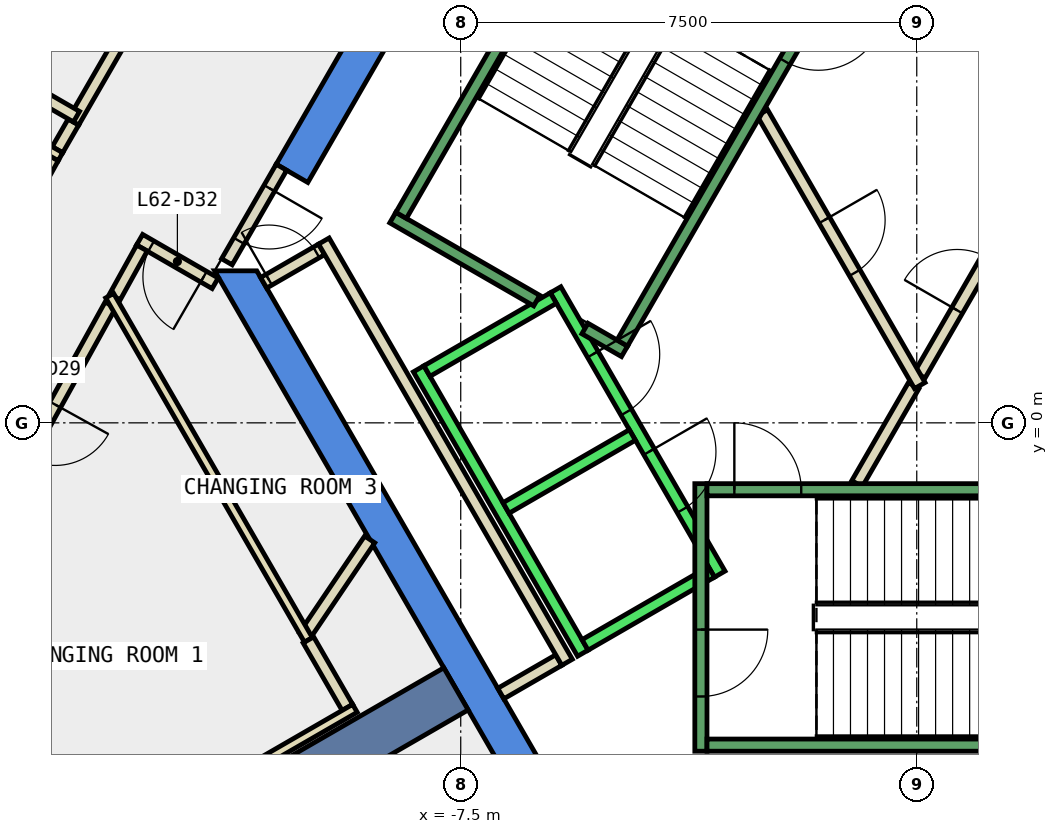
"""IFC4 building model, lengths in metres.
Left out: names, types, materials, properties, quantities, classifications, styles, units other than length and angle.
Written with IfcOpenShell. Run it as: python <this file> out.ifc"""

import sys

from ifc_helpers import new_model, si_unit, direction, frame, frame_2d, origin, place, context, subcontext, project, spatial, polyline, rectangle, outline, extrude, element, fill, save


model = new_model("IFC4")
c1 = context("Model", 3, precision=1e-05, world=origin(), true_north=direction((0.0, 1.0)))
c2 = subcontext(c1, "Body", "Model", "MODEL_VIEW")
j1 = project(units=[si_unit("LENGTHUNIT", "METRE"), si_unit("PLANEANGLEUNIT", "RADIAN")], contexts=[c1])
p1 = place(None, origin())
s1 = spatial("IfcSite", under=j1, at=p1, CompositionType="ELEMENT")
p2 = place(p1, origin())
s2 = spatial("IfcBuilding", under=s1, at=p2, CompositionType="ELEMENT")
p3 = place(p2, frame((0.0, 0.0, 270.2)))
s3 = spatial("IfcBuildingStorey", under=s2, at=p3, CompositionType="ELEMENT", Elevation=270.2)
p4 = place(p3, frame((0.0, 0.0, -0.34)))
e1 = element("IfcWall", 1, at=p4, inside=s3, PredefinedType="SHEAR", context=c2, shape_type="SweptSolid", body=[
    extrude(outline(polyline([(-10.535, 4.253), (-10.015, 3.953), (-5.427, 11.9), (-5.774, 12.5), (-10.535, 4.253)])), origin(), (0.0, 0.0, 1.0), 3.6),
])
p5 = place(p3, frame((0.0, 0.0, -0.34)))
e2 = element("IfcWall", 2, at=p5, inside=s3, PredefinedType="SHEAR", context=c2, shape_type="SweptSolid", body=[
    extrude(outline(polyline([(-11.547, 2.5), (-5.774, -7.5), (-5.427, -6.9), (-10.854, 2.5), (-11.547, 2.5)])), origin(), (0.0, 0.0, 1.0), 3.6),
])
p6 = place(p3, frame((-7.578, -4.375, -0.34), z_axis=(0.0, 0.0, 1.0), x_axis=(-0.866024315419, -0.5000018851, 0.0)))
e3 = element("IfcWall", 3, at=p6, inside=s3, PredefinedType="SHEAR", context=c2, shape_type="SweptSolid", body=[
    extrude(rectangle(XDim=9.0, YDim=0.8, at=frame_2d((4.5, 0.0))), origin(), (0.0, 0.0, 1.0), 3.6),
])
p7 = place(p3, frame((-11.539, 2.295, 0.0), z_axis=(0.0, 0.0, 1.0), x_axis=(-0.866023989838, 0.500002449018, 0.0)))
e4 = element("IfcWall", 4, at=p7, inside=s3, PredefinedType="PARTITIONING", context=c2, shape_type="SweptSolid", body=[
    extrude(rectangle(XDim=1.434, YDim=0.2, at=frame_2d((0.717, 0.0))), origin(), (0.0, 0.0, 1.0), 3.26),
])
p8 = place(p7, frame((0.217, 0.0, 0.0)))
e5 = element("IfcOpeningElement", 5, at=p8, cuts=e4, PredefinedType="OPENING", context=c2, shape_type="SweptSolid", body=[
    extrude(rectangle(XDim=1.0, YDim=2.1, at=frame_2d((0.5, 1.05))), frame((0.0, 0.11, 0.0), z_axis=(0.0, -1.0, 0.0), x_axis=(1.0, 0.0, 0.0)), (0.0, 0.0, 1.0), 0.22),
])
p9 = place(p3, frame((-12.743, 2.875, 0.0), z_axis=(0.0, 0.0, 1.0), x_axis=(-0.484334040176, -0.8748831565, 0.0)))
e6 = element("IfcWall", 6, at=p9, inside=s3, PredefinedType="PARTITIONING", context=c2, shape_type="SweptSolid", body=[
    extrude(rectangle(XDim=0.919, YDim=0.2, at=frame_2d((0.459, 0.0))), origin(), (0.0, 0.0, 1.0), 3.26),
])
p10 = place(p3, frame((-13.261, 1.939, 0.0), z_axis=(0.0, 0.0, 1.0), x_axis=(-0.484323615817, -0.874888927329, 0.0)))
e7 = element("IfcWall", 7, at=p10, inside=s3, PredefinedType="PARTITIONING", context=c2, shape_type="SweptSolid", body=[
    extrude(rectangle(XDim=4.747, YDim=0.2, at=frame_2d((2.374, 0.0))), origin(), (0.0, 0.0, 1.0), 3.26),
])
p11 = place(p10, frame((1.874, 0.0, 0.0)))
e8 = element("IfcOpeningElement", 8, at=p11, cuts=e7, PredefinedType="OPENING", context=c2, shape_type="SweptSolid", body=[
    extrude(rectangle(XDim=1.0, YDim=2.1, at=frame_2d((0.5, 1.05))), frame((0.0, 0.11, 0.0), z_axis=(0.0, -1.0, 0.0), x_axis=(1.0, 0.0, 0.0)), (0.0, 0.0, 1.0), 0.22),
])
p12 = place(p3, frame((-14.132, 4.492, 0.0), z_axis=(0.0, 0.0, 1.0), x_axis=(0.499829488579, 0.86612382622, 0.0)))
e9 = element("IfcWall", 9, at=p12, inside=s3, PredefinedType="PARTITIONING", context=c2, shape_type="SweptSolid", body=[
    extrude(rectangle(XDim=0.527, YDim=0.2, at=frame_2d((0.263, 0.0))), origin(), (0.0, 0.0, 1.0), 3.26),
])
p13 = place(p3, frame((-13.869, 4.948, 0.0), z_axis=(0.0, 0.0, 1.0), x_axis=(0.49994636267, 0.866056369097, 0.0)))
e10 = element("IfcWall", 10, at=p13, inside=s3, PredefinedType="PARTITIONING", context=c2, shape_type="SweptSolid", body=[
    extrude(rectangle(XDim=2.8, YDim=0.2, at=frame_2d((1.4, 0.0))), origin(), (0.0, 0.0, 1.0), 3.26),
])
p14 = place(p3, frame((-15.671, 1.714, 0.0), z_axis=(0.0, 0.0, 1.0), x_axis=(0.484203367026, 0.874955484216, 0.0)))
e11 = element("IfcWall", 11, at=p14, inside=s3, PredefinedType="PARTITIONING", context=c2, shape_type="SweptSolid", body=[
    extrude(rectangle(XDim=3.025, YDim=0.2, at=frame_2d((1.513, 0.0))), origin(), (0.0, 0.0, 1.0), 3.26),
])
p15 = place(p14, frame((1.013, 0.0, 0.0)))
e12 = element("IfcOpeningElement", 12, at=p15, cuts=e11, PredefinedType="OPENING", context=c2, shape_type="SweptSolid", body=[
    extrude(rectangle(XDim=1.0, YDim=2.1, at=frame_2d((0.5, 1.05))), frame((0.0, 0.11, 0.0), z_axis=(0.0, -1.0, 0.0), x_axis=(1.0, 0.0, 0.0)), (0.0, 0.0, 1.0), 0.22),
])
p16 = place(p3, frame((-5.888, -3.902, 0.0), z_axis=(0.0, 0.0, 1.0), x_axis=(-0.86621513555, -0.499671230855, 0.0)))
e13 = element("IfcWall", 13, at=p16, inside=s3, PredefinedType="PARTITIONING", context=c2, shape_type="SweptSolid", body=[
    extrude(rectangle(XDim=1.1, YDim=0.2, at=frame_2d((0.55, 0.0))), origin(), (0.0, 0.0, 1.0), 3.26),
])
p17 = place(p3, frame((-10.741, 2.303, 0.0), z_axis=(0.0, 0.0, 1.0), x_axis=(0.866063652425, 0.499933745558, 0.0)))
e14 = element("IfcWall", 14, at=p17, inside=s3, PredefinedType="PARTITIONING", context=c2, shape_type="SweptSolid", body=[
    extrude(rectangle(XDim=1.1, YDim=0.2, at=frame_2d((0.55, 0.0))), origin(), (0.0, 0.0, 1.0), 3.26),
])
p18 = place(p17, frame((0.1, 0.0, 0.0)))
e15 = element("IfcOpeningElement", 15, at=p18, cuts=e14, PredefinedType="OPENING", context=c2, shape_type="SweptSolid", body=[
    extrude(rectangle(XDim=0.9, YDim=2.1, at=frame_2d((0.45, 1.05))), frame((0.0, 0.11, 0.0), z_axis=(0.0, -1.0, 0.0), x_axis=(1.0, 0.0, 0.0)), (0.0, 0.0, 1.0), 0.22),
])
p19 = place(p3, frame((-9.751, 2.99, 0.0), z_axis=(0.0, 0.0, 1.0), x_axis=(0.500012163284, -0.866018381195, 0.0)))
e16 = element("IfcWall", 16, at=p19, inside=s3, PredefinedType="PARTITIONING", context=c2, shape_type="SweptSolid", body=[
    extrude(rectangle(XDim=8.0, YDim=0.2, at=frame_2d((4.0, 0.0))), origin(), (0.0, 0.0, 1.0), 3.26),
])
p20 = place(p3, frame((-10.069, -3.504, 0.0), z_axis=(0.0, 0.0, 1.0), x_axis=(0.559779346026, 0.828641710127, 0.0)))
e17 = element("IfcWall", 17, at=p20, inside=s3, PredefinedType="PARTITIONING", context=c2, shape_type="SweptSolid", body=[
    extrude(rectangle(XDim=1.915, YDim=0.2, at=frame_2d((0.958, 0.0))), origin(), (0.0, 0.0, 1.0), 3.26),
])
p21 = place(p3, frame((-13.274, 2.092, 0.0), z_axis=(0.0, 0.0, 1.0), x_axis=(0.500002592159, -0.866023907196, 0.0)))
e18 = element("IfcWall", 18, at=p21, inside=s3, PredefinedType="PARTITIONING", context=c2, shape_type="SweptSolid", body=[
    extrude(rectangle(XDim=6.538, YDim=0.15, at=frame_2d((3.269, 0.0))), origin(), (0.0, 0.0, 1.0), 3.26),
])
p22 = place(p3, frame((-0.982, -1.0, 0.0), z_axis=(0.0, 0.0, 1.0), x_axis=(0.50024047865, 0.865886518847, 0.0)))
e19 = element("IfcWall", 19, at=p22, inside=s3, PredefinedType="PARTITIONING", context=c2, shape_type="SweptSolid", body=[
    extrude(rectangle(XDim=1.863, YDim=0.2, at=frame_2d((0.931, 0.0))), origin(), (0.0, 0.0, 1.0), 3.26),
])
p23 = place(p3, frame((0.05, 0.787, 0.0), z_axis=(0.0, 0.0, 1.0), x_axis=(0.499954076797, 0.866051915934, 0.0)))
e20 = element("IfcWall", 20, at=p23, inside=s3, PredefinedType="PARTITIONING", context=c2, shape_type="SweptSolid", body=[
    extrude(rectangle(XDim=3.558, YDim=0.2, at=frame_2d((1.779, 0.0))), origin(), (0.0, 0.0, 1.0), 3.26),
])
p24 = place(p23, frame((1.229, 0.0, 0.0)))
e21 = element("IfcOpeningElement", 21, at=p24, cuts=e20, PredefinedType="OPENING", context=c2, shape_type="SweptSolid", body=[
    extrude(rectangle(XDim=1.0, YDim=2.1, at=frame_2d((0.5, 1.05))), frame((0.0, 0.11, 0.0), z_axis=(0.0, -1.0, 0.0), x_axis=(1.0, 0.0, 0.0)), (0.0, 0.0, 1.0), 0.22),
])
p25 = place(p3, frame((-2.54, 5.1, 0.0), z_axis=(0.0, 0.0, 1.0), x_axis=(0.499925051871, -0.866068670783, 0.0)))
e22 = element("IfcWall", 22, at=p25, inside=s3, PredefinedType="PARTITIONING", context=c2, shape_type="SweptSolid", body=[
    extrude(rectangle(XDim=5.181, YDim=0.2, at=frame_2d((2.59, 0.0))), origin(), (0.0, 0.0, 1.0), 3.26),
])
p26 = place(p25, frame((2.04, 0.0, 0.0)))
e23 = element("IfcOpeningElement", 23, at=p26, cuts=e22, PredefinedType="OPENING", context=c2, shape_type="SweptSolid", body=[
    extrude(rectangle(XDim=1.0, YDim=2.1, at=frame_2d((0.5, 1.05))), frame((0.0, 0.11, 0.0), z_axis=(0.0, -1.0, 0.0), x_axis=(1.0, 0.0, 0.0)), (0.0, 0.0, 1.0), 0.22),
])
p27 = place(p3, frame((-9.364, -4.68, 0.0), z_axis=(0.0, 0.0, 1.0), x_axis=(-0.500052244015, 0.865995238587, 0.0)))
e24 = element("IfcWall", 24, at=p27, inside=s3, PredefinedType="PARTITIONING", context=c2, shape_type="SweptSolid", body=[
    extrude(rectangle(XDim=1.281, YDim=0.2, at=frame_2d((0.641, 0.0))), origin(), (0.0, 0.0, 1.0), 3.26),
])
p28 = place(p3, frame((-9.24, -4.695, 0.0), z_axis=(0.0, 0.0, 1.0), x_axis=(-0.866015037582, -0.500017954359, 0.0)))
e25 = element("IfcWall", 25, at=p28, inside=s3, PredefinedType="PARTITIONING", context=c2, shape_type="SweptSolid", body=[
    extrude(rectangle(XDim=7.176, YDim=0.15, at=frame_2d((3.588, 0.0))), origin(), (0.0, 0.0, 1.0), 3.26),
])
p29 = place(p3, frame((-15.984, 6.285, 0.0), z_axis=(0.0, 0.0, 1.0), x_axis=(0.865998541277, -0.500046524342, 0.0)))
e26 = element("IfcWall", 26, at=p29, inside=s3, PredefinedType="PARTITIONING", context=c2, shape_type="SweptSolid", body=[
    extrude(rectangle(XDim=2.5, YDim=0.2, at=frame_2d((1.25, 0.0))), origin(), (0.0, 0.0, 1.0), 3.26),
])
p30 = place(p3, frame((-14.083, 4.377, 0.0), z_axis=(0.0, 0.0, 1.0), x_axis=(-0.870415885751, 0.492317159799, 0.0)))
e27 = element("IfcWall", 27, at=p30, inside=s3, PredefinedType="PARTITIONING", context=c2, shape_type="SweptSolid", body=[
    extrude(rectangle(XDim=4.581, YDim=0.15, at=frame_2d((2.29, 0.0))), origin(), (0.0, 0.0, 1.0), 3.26),
])
p31 = place(p3, frame((-10.449, 4.203, 0.0), z_axis=(0.0, 0.0, 1.0), x_axis=(-0.499914839587, -0.866074565589, 0.0)))
e28 = element("IfcWall", 28, at=p31, inside=s3, PredefinedType="PARTITIONING", context=c2, shape_type="SweptSolid", body=[
    extrude(rectangle(XDim=1.794, YDim=0.2, at=frame_2d((0.897, 0.0))), origin(), (0.0, 0.0, 1.0), 2.4),
])
p32 = place(p31, frame((0.397, 0.0, 0.0)))
e29 = element("IfcOpeningElement", 29, at=p32, cuts=e28, PredefinedType="OPENING", context=c2, shape_type="SweptSolid", body=[
    extrude(rectangle(XDim=1.0, YDim=2.1, at=frame_2d((0.5, 1.05))), frame((0.0, 0.11, 0.0), z_axis=(0.0, -1.0, 0.0), x_axis=(1.0, 0.0, 0.0)), (0.0, 0.0, 1.0), 0.22),
])
p33 = place(p3, frame((-5.94, 2.188, 0.0), z_axis=(0.0, 0.0, 1.0), x_axis=(0.500034260056, -0.866005622828, 0.0)))
e30 = element("IfcWall", 30, at=p33, inside=s3, PredefinedType="STANDARD", context=c2, shape_type="SweptSolid", body=[
    extrude(rectangle(XDim=5.399, YDim=0.2, at=frame_2d((2.7, 0.0))), origin(), (0.0, 0.0, 1.0), 3.26),
])
p34 = place(p33, frame((3.075, 0.0, 0.0)))
e31 = element("IfcOpeningElement", 31, at=p34, cuts=e30, PredefinedType="OPENING", context=c2, shape_type="SweptSolid", body=[
    extrude(rectangle(XDim=1.1, YDim=2.1, at=frame_2d((0.55, 1.05))), frame((0.0, 0.11, 0.0), z_axis=(0.0, -1.0, 0.0), x_axis=(1.0, 0.0, 0.0)), (0.0, 0.0, 1.0), 0.22),
])
p35 = place(p33, frame((1.225, 0.0, 0.0)))
e32 = element("IfcOpeningElement", 32, at=p35, cuts=e30, PredefinedType="OPENING", context=c2, shape_type="SweptSolid", body=[
    extrude(rectangle(XDim=1.1, YDim=2.1, at=frame_2d((0.55, 1.05))), frame((0.0, 0.11, 0.0), z_axis=(0.0, -1.0, 0.0), x_axis=(1.0, 0.0, 0.0)), (0.0, 0.0, 1.0), 0.22),
])
p36 = place(p3, frame((-8.192, 0.888, 0.0), z_axis=(0.0, 0.0, 1.0), x_axis=(0.500034260056, -0.866005622828, 0.0)))
e33 = element("IfcWall", 33, at=p36, inside=s3, PredefinedType="STANDARD", context=c2, shape_type="SweptSolid", body=[
    extrude(rectangle(XDim=5.399, YDim=0.2, at=frame_2d((2.7, 0.0))), origin(), (0.0, 0.0, 1.0), 3.26),
])
for number, where, z_axis, x_axis in (
    (34, (-5.977, 2.052, 0.0), (0.0, 0.0, 1.0), (-0.866, -0.5, 0.0)),
    (35, (-4.677, -0.2, 0.0), (0.0, 0.0, 1.0), (-0.866, -0.5, 0.0)),
):
    element("IfcWall", number, at=place(p3, frame(where, z_axis=z_axis, x_axis=x_axis)), inside=s3, PredefinedType="STANDARD", context=c2, shape_type="SweptSolid", body=[
        extrude(rectangle(XDim=2.399, YDim=0.2, at=frame_2d((1.2, 0.0))), origin(), (0.0, 0.0, 1.0), 3.26),
    ])
p37 = place(p3, frame((-3.377, -2.452, 0.0), z_axis=(0.0, 0.0, 1.0), x_axis=(-0.865955154139, -0.50012165622, 0.0)))
e36 = element("IfcWall", 36, at=p37, inside=s3, PredefinedType="STANDARD", context=c2, shape_type="SweptSolid", body=[
    extrude(rectangle(XDim=2.4, YDim=0.2, at=frame_2d((1.2, 0.0))), origin(), (0.0, 0.0, 1.0), 3.26),
])
p38 = place(p3, frame((-3.55, -1.0, 0.0), z_axis=(0.0, 0.0, 1.0), x_axis=(0.0, -1.0, 0.0)))
e37 = element("IfcWall", 37, at=p38, inside=s3, PredefinedType="STANDARD", context=c2, shape_type="SweptSolid", body=[
    extrude(rectangle(XDim=4.4, YDim=0.2, at=frame_2d((2.2, 0.0))), origin(), (0.0, 0.0, 1.0), 3.26),
])
p39 = place(p38, frame((2.4, 0.0, 0.0)))
e38 = element("IfcOpeningElement", 38, at=p39, cuts=e37, PredefinedType="OPENING", context=c2, shape_type="SweptSolid", body=[
    extrude(rectangle(XDim=1.1, YDim=2.2, at=frame_2d((0.55, 1.1))), frame((0.0, 0.11, 0.0), z_axis=(0.0, -1.0, 0.0), x_axis=(1.0, 0.0, 0.0)), (0.0, 0.0, 1.0), 0.22),
])
p40 = place(p3, frame((-3.45, -1.1, 0.0), z_axis=(0.0, 0.0, 1.0), x_axis=(1.0, 0.0, 0.0)))
e39 = element("IfcWall", 39, at=p40, inside=s3, PredefinedType="STANDARD", context=c2, shape_type="SweptSolid", body=[
    extrude(rectangle(XDim=6.9, YDim=0.2, at=frame_2d((3.45, 0.0))), origin(), (0.0, 0.0, 1.0), 3.26),
])
p41 = place(p40, frame((0.45, 0.0, 0.0)))
e40 = element("IfcOpeningElement", 40, at=p41, cuts=e39, PredefinedType="OPENING", context=c2, shape_type="SweptSolid", body=[
    extrude(rectangle(XDim=1.1, YDim=2.2, at=frame_2d((0.55, 1.1))), frame((0.0, 0.11, 0.0), z_axis=(0.0, -1.0, 0.0), x_axis=(1.0, 0.0, 0.0)), (0.0, 0.0, 1.0), 0.22),
])
p42 = place(p3, frame((-3.45, -5.3, 0.0), z_axis=(0.0, 0.0, 1.0), x_axis=(1.0, 0.0, 0.0)))
e41 = element("IfcWall", 41, at=p42, inside=s3, PredefinedType="STANDARD", context=c2, shape_type="SweptSolid", body=[
    extrude(rectangle(XDim=6.9, YDim=0.2, at=frame_2d((3.45, 0.0))), origin(), (0.0, 0.0, 1.0), 3.26),
])
p43 = place(p3, frame((-6.25, 2.01, 0.0), z_axis=(0.0, 0.0, 1.0), x_axis=(-0.86611865017, 0.499838457731, 0.0)))
e42 = element("IfcWall", 42, at=p43, inside=s3, PredefinedType="STANDARD", context=c2, shape_type="SweptSolid", body=[
    extrude(rectangle(XDim=2.733, YDim=0.2, at=frame_2d((1.366, 0.0))), origin(), (0.0, 0.0, 1.0), 3.26),
])
p44 = place(p3, frame((-4.806, 1.176, 0.0), z_axis=(0.0, 0.0, 1.0), x_axis=(-0.866558586415, 0.499075361355, 0.0)))
e43 = element("IfcWall", 43, at=p44, inside=s3, PredefinedType="STANDARD", context=c2, shape_type="SweptSolid", body=[
    extrude(rectangle(XDim=0.751, YDim=0.2, at=frame_2d((0.376, 0.0))), origin(), (0.0, 0.0, 1.0), 3.26),
])
p45 = place(p3, frame((-1.393, 7.288, 0.0), z_axis=(0.0, 0.0, 1.0), x_axis=(-0.499963383562, -0.866046543262, 0.0)))
e44 = element("IfcWall", 44, at=p45, inside=s3, PredefinedType="STANDARD", context=c2, shape_type="SweptSolid", body=[
    extrude(rectangle(XDim=6.9, YDim=0.2, at=frame_2d((3.45, 0.0))), origin(), (0.0, 0.0, 1.0), 3.26),
])
p46 = place(p45, frame((0.45, 0.0, 0.0)))
e45 = element("IfcOpeningElement", 45, at=p46, cuts=e44, PredefinedType="OPENING", context=c2, shape_type="SweptSolid", body=[
    extrude(rectangle(XDim=1.1, YDim=2.2, at=frame_2d((0.55, 1.1))), frame((0.0, 0.11, 0.0), z_axis=(0.0, -1.0, 0.0), x_axis=(1.0, 0.0, 0.0)), (0.0, 0.0, 1.0), 0.22),
])
p47 = place(p3, frame((-5.03, 9.388, 0.0), z_axis=(0.0, 0.0, 1.0), x_axis=(-0.499978703459, -0.866037698999, 0.0)))
e46 = element("IfcWall", 46, at=p47, inside=s3, PredefinedType="STANDARD", context=c2, shape_type="SweptSolid", body=[
    extrude(rectangle(XDim=6.9, YDim=0.2, at=frame_2d((3.45, 0.0))), origin(), (0.0, 0.0, 1.0), 3.26),
])
p48 = place(p11, origin())
e47 = element("IfcDoor", 47, at=p48, inside=s3, OperationType="SINGLE_SWING_LEFT", PredefinedType="DOOR", context=c2, shape_type="SweptSolid", body=[
    extrude(rectangle(XDim=1.0, YDim=2.1, at=frame_2d((0.5, 1.05))), frame((0.0, 0.025, 0.0), z_axis=(0.0, -1.0, 0.0), x_axis=(1.0, 0.0, 0.0)), (0.0, 0.0, 1.0), 0.05),
])
fill(e8, e47)
p49 = place(p8, origin())
e48 = element("IfcDoor", 48, at=p49, inside=s3, OperationType="SINGLE_SWING_RIGHT", PredefinedType="DOOR", context=c2, shape_type="SweptSolid", body=[
    extrude(rectangle(XDim=1.0, YDim=2.1, at=frame_2d((0.5, 1.05))), frame((0.0, 0.025, 0.0), z_axis=(0.0, -1.0, 0.0), x_axis=(1.0, 0.0, 0.0)), (0.0, 0.0, 1.0), 0.05),
])
fill(e5, e48)
p50 = place(p24, origin())
e49 = element("IfcDoor", 49, at=p50, inside=s3, OperationType="SINGLE_SWING_RIGHT", PredefinedType="DOOR", context=c2, shape_type="SweptSolid", body=[
    extrude(rectangle(XDim=1.0, YDim=2.1, at=frame_2d((0.5, 1.05))), frame((0.0, 0.025, 0.0), z_axis=(0.0, -1.0, 0.0), x_axis=(1.0, 0.0, 0.0)), (0.0, 0.0, 1.0), 0.05),
])
fill(e21, e49)
p51 = place(p26, origin())
e50 = element("IfcDoor", 50, at=p51, inside=s3, OperationType="SINGLE_SWING_RIGHT", PredefinedType="DOOR", context=c2, shape_type="SweptSolid", body=[
    extrude(rectangle(XDim=1.0, YDim=2.1, at=frame_2d((0.5, 1.05))), frame((0.0, 0.025, 0.0), z_axis=(0.0, -1.0, 0.0), x_axis=(1.0, 0.0, 0.0)), (0.0, 0.0, 1.0), 0.05),
])
fill(e23, e50)
p52 = place(p18, origin())
e51 = element("IfcDoor", 51, at=p52, inside=s3, OperationType="SINGLE_SWING_RIGHT", PredefinedType="DOOR", context=c2, shape_type="SweptSolid", body=[
    extrude(rectangle(XDim=0.9, YDim=2.1, at=frame_2d((0.45, 1.05))), frame((0.0, 0.025, 0.0), z_axis=(0.0, -1.0, 0.0), x_axis=(1.0, 0.0, 0.0)), (0.0, 0.0, 1.0), 0.05),
])
fill(e15, e51)
p53 = place(p32, origin())
e52 = element("IfcDoor", 52, at=p53, inside=s3, OperationType="SINGLE_SWING_LEFT", PredefinedType="DOOR", context=c2, shape_type="SweptSolid", body=[
    extrude(rectangle(XDim=1.0, YDim=2.1, at=frame_2d((0.5, 1.05))), frame((0.0, 0.025, 0.0), z_axis=(0.0, -1.0, 0.0), x_axis=(1.0, 0.0, 0.0)), (0.0, 0.0, 1.0), 0.05),
])
fill(e29, e52)
p54 = place(p34, origin())
e53 = element("IfcDoor", 53, at=p54, inside=s3, OperationType="SLIDING_TO_LEFT", PredefinedType="DOOR", context=c2, shape_type="SweptSolid", body=[
    extrude(rectangle(XDim=1.1, YDim=2.1, at=frame_2d((0.55, 1.05))), frame((0.0, 0.025, 0.0), z_axis=(0.0, -1.0, 0.0), x_axis=(1.0, 0.0, 0.0)), (0.0, 0.0, 1.0), 0.05),
])
fill(e31, e53)
p55 = place(p35, origin())
e54 = element("IfcDoor", 54, at=p55, inside=s3, OperationType="SLIDING_TO_LEFT", PredefinedType="DOOR", context=c2, shape_type="SweptSolid", body=[
    extrude(rectangle(XDim=1.1, YDim=2.1, at=frame_2d((0.55, 1.05))), frame((0.0, 0.025, 0.0), z_axis=(0.0, -1.0, 0.0), x_axis=(1.0, 0.0, 0.0)), (0.0, 0.0, 1.0), 0.05),
])
fill(e32, e54)
p56 = place(p41, origin())
e55 = element("IfcDoor", 55, at=p56, inside=s3, OperationType="SINGLE_SWING_LEFT", PredefinedType="DOOR", context=c2, shape_type="SweptSolid", body=[
    extrude(rectangle(XDim=1.1, YDim=2.2, at=frame_2d((0.55, 1.1))), frame((0.0, 0.025, 0.0), z_axis=(0.0, -1.0, 0.0), x_axis=(1.0, 0.0, 0.0)), (0.0, 0.0, 1.0), 0.05),
])
fill(e40, e55)
p57 = place(p39, origin())
e56 = element("IfcDoor", 56, at=p57, inside=s3, OperationType="SINGLE_SWING_LEFT", PredefinedType="DOOR", context=c2, shape_type="SweptSolid", body=[
    extrude(rectangle(XDim=1.1, YDim=2.2, at=frame_2d((0.55, 1.1))), frame((0.0, 0.025, 0.0), z_axis=(0.0, -1.0, 0.0), x_axis=(1.0, 0.0, 0.0)), (0.0, 0.0, 1.0), 0.05),
])
fill(e38, e56)
p58 = place(p46, origin())
e57 = element("IfcDoor", 57, at=p58, inside=s3, OperationType="SINGLE_SWING_LEFT", PredefinedType="DOOR", context=c2, shape_type="SweptSolid", body=[
    extrude(rectangle(XDim=1.1, YDim=2.2, at=frame_2d((0.55, 1.1))), frame((0.0, 0.025, 0.0), z_axis=(0.0, -1.0, 0.0), x_axis=(1.0, 0.0, 0.0)), (0.0, 0.0, 1.0), 0.05),
])
fill(e45, e57)
save(model, sys.argv[1])
